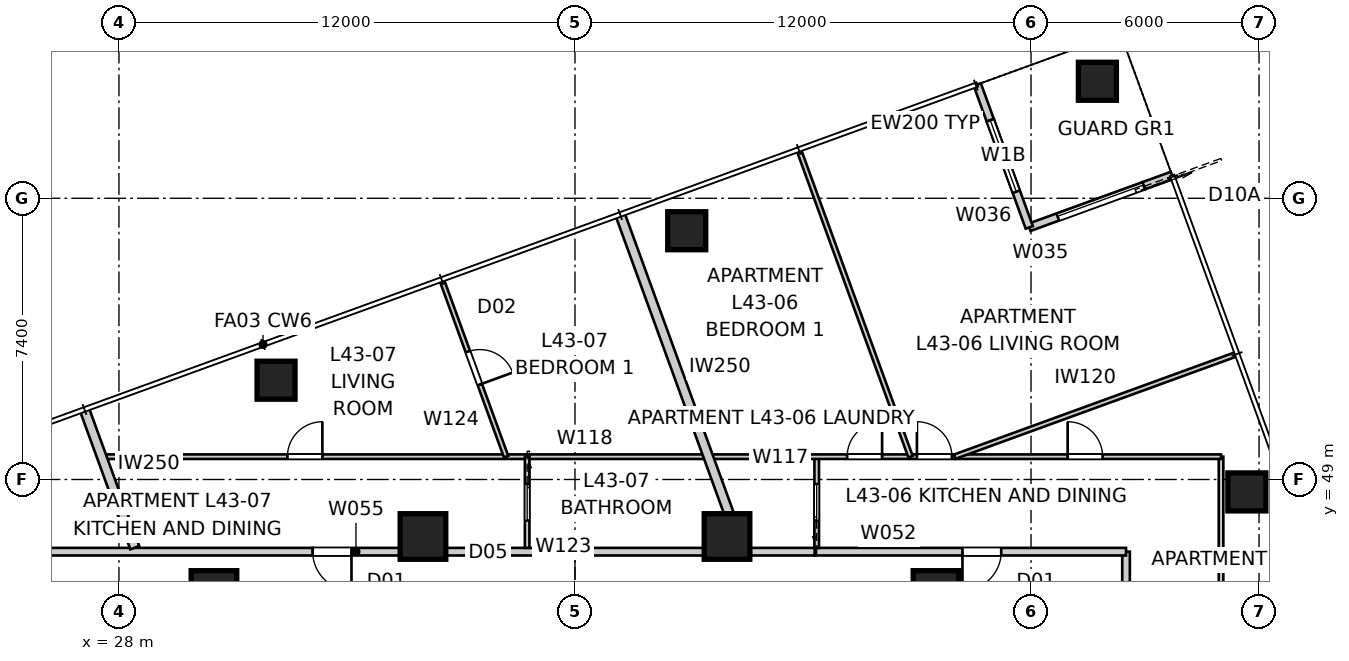
"""IFC4 building model, lengths in metres.
Left out: names, types, materials, properties, quantities, classifications, styles, units other than length and angle.
Written with IfcOpenShell. Run it as: python <this file> out.ifc"""

import sys

from ifc_helpers import new_model, si_unit, direction, frame, frame_2d, origin, origin_2d, place, context, subcontext, project, spatial, rectangle, extrude, element, fill, save


model = new_model("IFC4")
c1 = context("Model", 3, precision=1e-05, world=origin(), true_north=direction((0.0, 1.0)))
c2 = subcontext(c1, "Body", "Model", "MODEL_VIEW")
j1 = project(units=[si_unit("LENGTHUNIT", "METRE"), si_unit("PLANEANGLEUNIT", "RADIAN")], contexts=[c1])
p1 = place(None, origin())
s1 = spatial("IfcSite", under=j1, at=p1, CompositionType="ELEMENT")
p2 = place(p1, origin())
s2 = spatial("IfcBuilding", under=s1, at=p2, CompositionType="ELEMENT")
p3 = place(p2, frame((0.0, 0.0, 157.4)))
s3 = spatial("IfcBuildingStorey", under=s2, at=p3, CompositionType="ELEMENT", Elevation=157.4)
for number, where, z_axis, x_axis in (
    (1, (57.68, 48.673, 0.0), (0.0, 0.0, 1.0), (1.0, 0.0, 0.0)),
    (2, (53.747, 59.479, 0.0), (0.0, 0.0, 1.0), (1.0, 0.0, 0.0)),
    (3, (42.94, 55.546, 0.0), (0.0, 0.0, 1.0), (1.0, 0.0, 0.0)),
    (4, (32.134, 51.613, 0.0), (0.0, 0.0, 1.0), (1.0, 0.0, 0.0)),
):
    element("IfcColumn", number, at=place(p3, frame(where, z_axis=z_axis, x_axis=x_axis)), inside=s3, PredefinedType="COLUMN", context=c2, shape_type="SweptSolid", body=[
        extrude(rectangle(XDim=1.0, YDim=1.0, at=origin_2d()), origin(), (0.0, 0.0, 1.0), 3.4),
    ])
for number, where, z_axis, x_axis in (
    (5, (49.5, 46.0, 0.0), (0.0, 0.0, 1.0), (1.0, 0.0, 0.0)),
    (6, (44.0, 47.5, 0.0), (0.0, 0.0, 1.0), (1.0, 0.0, 0.0)),
    (7, (36.0, 47.5, 0.0), (0.0, 0.0, 1.0), (1.0, 0.0, 0.0)),
    (8, (30.5, 46.0, 0.0), (0.0, 0.0, 1.0), (1.0, 0.0, 0.0)),
):
    element("IfcColumn", number, at=place(p3, frame(where, z_axis=z_axis, x_axis=x_axis)), inside=s3, PredefinedType="COLUMN", context=c2, shape_type="SweptSolid", body=[
        extrude(rectangle(XDim=1.2, YDim=1.2, at=origin_2d()), origin(), (0.0, 0.0, 1.0), 3.4),
    ])
p4 = place(p3, frame((55.712, 57.002, 0.0), z_axis=(0.0, 0.0, 1.0), x_axis=(-0.939659694648, -0.342110593602, 0.0)))
e9 = element("IfcWall", 9, at=p4, inside=s3, PredefinedType="SOLIDWALL", context=c2, shape_type="SweptSolid", body=[
    extrude(rectangle(XDim=0.8, YDim=0.2, at=frame_2d((0.4, 0.0))), origin(), (0.0, 0.0, 1.0), 3.25),
])
p5 = place(p3, frame((54.96, 56.729, 0.0), z_axis=(0.0, 0.0, 1.0), x_axis=(-0.939693144909, -0.342018703306, 0.0)))
e10 = element("IfcWall", 10, at=p5, inside=s3, PredefinedType="SOLIDWALL", context=c2, shape_type="SweptSolid", body=[
    extrude(rectangle(XDim=3.2, YDim=0.2, at=frame_2d((1.6, 0.0))), origin(), (0.0, 0.0, 1.0), 2.722),
])
p6 = place(p5, origin())
e11 = element("IfcOpeningElement", 11, at=p6, cuts=e10, PredefinedType="OPENING", context=c2, shape_type="SweptSolid", body=[
    extrude(rectangle(XDim=2.4, YDim=2.1, at=frame_2d((1.2, 1.05))), frame((0.0, 0.11, 0.0), z_axis=(0.0, -1.0, 0.0), x_axis=(1.0, 0.0, 0.0)), (0.0, 0.0, 1.0), 0.22),
])
p7 = place(p3, frame((51.953, 55.634, 0.0), z_axis=(0.0, 0.0, 1.0), x_axis=(-0.341965219194, 0.939712609717, 0.0)))
e12 = element("IfcWall", 12, at=p7, inside=s3, PredefinedType="SOLIDWALL", context=c2, shape_type="SweptSolid", body=[
    extrude(rectangle(XDim=3.0, YDim=0.2, at=frame_2d((1.5, 0.0))), origin(), (0.0, 0.0, 1.0), 2.722),
])
p8 = place(p7, frame((1.0, 0.0, 0.45)))
e13 = element("IfcOpeningElement", 13, at=p8, cuts=e12, PredefinedType="OPENING", context=c2, shape_type="SweptSolid", body=[
    extrude(rectangle(XDim=2.0, YDim=1.8, at=frame_2d((1.0, 0.9))), frame((0.0, 0.11, 0.0), z_axis=(0.0, -1.0, 0.0), x_axis=(1.0, 0.0, 0.0)), (0.0, 0.0, 1.0), 0.22),
])
p9 = place(p3, frame((50.927, 58.453, 0.0), z_axis=(0.0, 0.0, 1.0), x_axis=(-0.342037080957, 0.939686455819, 0.0)))
e14 = element("IfcWall", 14, at=p9, inside=s3, PredefinedType="SOLIDWALL", context=c2, shape_type="SweptSolid", body=[
    extrude(rectangle(XDim=1.0, YDim=0.2, at=frame_2d((0.5, 0.0))), origin(), (0.0, 0.0, 1.0), 3.25),
])
p10 = place(p3, frame((54.5, 13.7, 0.0), z_axis=(0.0, 0.0, 1.0), x_axis=(0.0, 1.0, 0.0)))
e15 = element("IfcWall", 15, at=p10, inside=s3, PredefinedType="PARTITIONING", context=c2, shape_type="SweptSolid", body=[
    extrude(rectangle(XDim=33.4, YDim=0.2, at=frame_2d((16.7, 0.0))), origin(), (0.0, 0.0, 1.0), 3.25),
])
p11 = place(p10, frame((5.028, 0.0, 0.0)))
e16 = element("IfcOpeningElement", 16, at=p11, cuts=e15, PredefinedType="OPENING", context=c2, shape_type="SweptSolid", body=[
    extrude(rectangle(XDim=1.02, YDim=2.1, at=frame_2d((0.51, 1.05))), frame((0.0, 0.11, 0.0), z_axis=(0.0, -1.0, 0.0), x_axis=(1.0, 0.0, 0.0)), (0.0, 0.0, 1.0), 0.22),
])
p12 = place(p10, frame((13.587, 0.0, 0.0)))
e17 = element("IfcOpeningElement", 17, at=p12, cuts=e15, PredefinedType="OPENING", context=c2, shape_type="SweptSolid", body=[
    extrude(rectangle(XDim=1.02, YDim=2.34, at=frame_2d((0.51, 1.17))), frame((0.0, 0.11, 0.0), z_axis=(0.0, -1.0, 0.0), x_axis=(1.0, 0.0, 0.0)), (0.0, 0.0, 1.0), 0.22),
])
p13 = place(p3, frame((54.5, 47.1, 0.0), z_axis=(0.0, 0.0, 1.0), x_axis=(-1.0, 0.0, 0.0)))
e18 = element("IfcWall", 18, at=p13, inside=s3, PredefinedType="PARTITIONING", context=c2, shape_type="SweptSolid", body=[
    extrude(rectangle(XDim=8.192, YDim=0.2, at=frame_2d((4.096, 0.0))), origin(), (0.0, 0.0, 1.0), 3.25),
])
p14 = place(p13, frame((3.285, 0.0, 0.0)))
e19 = element("IfcOpeningElement", 19, at=p14, cuts=e18, PredefinedType="OPENING", context=c2, shape_type="SweptSolid", body=[
    extrude(rectangle(XDim=1.02, YDim=2.34, at=frame_2d((0.51, 1.17))), frame((0.0, 0.11, 0.0), z_axis=(0.0, -1.0, 0.0), x_axis=(1.0, 0.0, 0.0)), (0.0, 0.0, 1.0), 0.22),
])
p15 = place(p3, frame((46.308, 47.1, 0.0), z_axis=(0.0, 0.0, 1.0), x_axis=(-1.0, 0.0, 0.0)))
e20 = element("IfcWall", 20, at=p15, inside=s3, PredefinedType="PARTITIONING", context=c2, shape_type="SweptSolid", body=[
    extrude(rectangle(XDim=1.683, YDim=0.2, at=frame_2d((0.842, 0.0))), origin(), (0.0, 0.0, 1.0), 2.55),
])
p16 = place(p3, frame((44.625, 47.1, 0.0), z_axis=(0.0, 0.0, 1.0), x_axis=(-1.0, 0.0, 0.0)))
e21 = element("IfcWall", 21, at=p16, inside=s3, PredefinedType="PARTITIONING", context=c2, shape_type="SweptSolid", body=[
    extrude(rectangle(XDim=9.25, YDim=0.2, at=frame_2d((4.625, 0.0))), origin(), (0.0, 0.0, 1.0), 3.25),
])
p17 = place(p3, frame((35.375, 47.1, 0.0), z_axis=(0.0, 0.0, 1.0), x_axis=(-1.0, 0.0, 0.0)))
e22 = element("IfcWall", 22, at=p17, inside=s3, PredefinedType="PARTITIONING", context=c2, shape_type="SweptSolid", body=[
    extrude(rectangle(XDim=2.277, YDim=0.2, at=frame_2d((1.138, 0.0))), origin(), (0.0, 0.0, 1.0), 2.55),
])
p18 = place(p17, frame((1.257, 0.0, 0.0)))
e23 = element("IfcOpeningElement", 23, at=p18, cuts=e22, PredefinedType="OPENING", context=c2, shape_type="SweptSolid", body=[
    extrude(rectangle(XDim=1.02, YDim=2.34, at=frame_2d((0.51, 1.17))), frame((0.0, 0.11, 0.0), z_axis=(0.0, -1.0, 0.0), x_axis=(1.0, 0.0, 0.0)), (0.0, 0.0, 1.0), 0.22),
])
p19 = place(p3, frame((33.098, 47.1, 0.0), z_axis=(0.0, 0.0, 1.0), x_axis=(-1.0, 0.0, 0.0)))
e24 = element("IfcWall", 24, at=p19, inside=s3, PredefinedType="PARTITIONING", context=c2, shape_type="SweptSolid", body=[
    extrude(rectangle(XDim=7.598, YDim=0.2, at=frame_2d((3.799, 0.0))), origin(), (0.0, 0.0, 1.0), 3.25),
])
p20 = place(p3, frame((41.188, 55.973, 0.0), z_axis=(0.0, 0.0, 1.0), x_axis=(0.342014066156, -0.939694832673, 0.0)))
e25 = element("IfcWall", 25, at=p20, inside=s3, PredefinedType="PARTITIONING", context=c2, shape_type="SweptSolid", body=[
    extrude(rectangle(XDim=9.331, YDim=0.25, at=frame_2d((4.665, 0.0))), origin(), (0.0, 0.0, 1.0), 3.25),
])
p21 = place(p3, frame((27.093, 50.843, 0.0), z_axis=(0.0, 0.0, 1.0), x_axis=(0.342031698406, -0.939688415, 0.0)))
e26 = element("IfcWall", 26, at=p21, inside=s3, PredefinedType="PARTITIONING", context=c2, shape_type="SweptSolid", body=[
    extrude(rectangle(XDim=3.871, YDim=0.25, at=frame_2d((1.936, 0.0))), origin(), (0.0, 0.0, 1.0), 3.25),
])
p22 = place(p3, frame((57.0, 49.6, 0.0), z_axis=(0.0, 0.0, 1.0), x_axis=(0.0, -1.0, 0.0)))
e27 = element("IfcWall", 27, at=p22, inside=s3, PredefinedType="PARTITIONING", context=c2, shape_type="SweptSolid", body=[
    extrude(rectangle(XDim=18.589, YDim=0.12, at=frame_2d((9.294, 0.0))), origin(), (0.0, 0.0, 1.0), 2.55),
])
p23 = place(p22, frame((8.452, 0.0, 0.0)))
e28 = element("IfcOpeningElement", 28, at=p23, cuts=e27, PredefinedType="OPENING", context=c2, shape_type="SweptSolid", body=[
    extrude(rectangle(XDim=0.96, YDim=2.1, at=frame_2d((0.48, 1.05))), frame((0.0, 0.07, 0.0), z_axis=(0.0, -1.0, 0.0), x_axis=(1.0, 0.0, 0.0)), (0.0, 0.0, 1.0), 0.14),
])
p24 = place(p22, frame((11.889, 0.0, 0.0)))
e29 = element("IfcOpeningElement", 29, at=p24, cuts=e27, PredefinedType="OPENING", context=c2, shape_type="SweptSolid", body=[
    extrude(rectangle(XDim=0.96, YDim=2.1, at=frame_2d((0.48, 1.05))), frame((0.0, 0.07, 0.0), z_axis=(0.0, -1.0, 0.0), x_axis=(1.0, 0.0, 0.0)), (0.0, 0.0, 1.0), 0.14),
])
p25 = place(p3, frame((46.361, 47.2, 0.0), z_axis=(0.0, 0.0, 1.0), x_axis=(0.0, 1.0, 0.0)))
e30 = element("IfcWall", 30, at=p25, inside=s3, PredefinedType="PARTITIONING", context=c2, shape_type="SweptSolid", body=[
    extrude(rectangle(XDim=2.4, YDim=0.12, at=frame_2d((1.2, 0.0))), origin(), (0.0, 0.0, 1.0), 3.25),
])
p26 = place(p25, frame((0.72, 0.0, 0.0)))
e31 = element("IfcOpeningElement", 31, at=p26, cuts=e30, PredefinedType="OPENING", context=c2, shape_type="SweptSolid", body=[
    extrude(rectangle(XDim=0.96, YDim=2.1, at=frame_2d((0.48, 1.05))), frame((0.0, 0.07, 0.0), z_axis=(0.0, -1.0, 0.0), x_axis=(1.0, 0.0, 0.0)), (0.0, 0.0, 1.0), 0.14),
])
p27 = place(p3, frame((27.545, 49.6, 0.0), z_axis=(0.0, 0.0, 1.0), x_axis=(1.0, 0.0, 0.0)))
e32 = element("IfcWall", 32, at=p27, inside=s3, PredefinedType="PARTITIONING", context=c2, shape_type="SweptSolid", body=[
    extrude(rectangle(XDim=29.455, YDim=0.12, at=frame_2d((14.727, 0.0))), origin(), (0.0, 0.0, 1.0), 3.25),
])
p28 = place(p27, frame((4.887, 0.0, 0.0)))
e33 = element("IfcOpeningElement", 33, at=p28, cuts=e32, PredefinedType="OPENING", context=c2, shape_type="SweptSolid", body=[
    extrude(rectangle(XDim=0.92, YDim=2.34, at=frame_2d((0.46, 1.17))), frame((0.0, 0.07, 0.0), z_axis=(0.0, -1.0, 0.0), x_axis=(1.0, 0.0, 0.0)), (0.0, 0.0, 1.0), 0.14),
])
p29 = place(p27, frame((25.418, 0.0, 0.0)))
e34 = element("IfcOpeningElement", 34, at=p29, cuts=e32, PredefinedType="OPENING", context=c2, shape_type="SweptSolid", body=[
    extrude(rectangle(XDim=0.92, YDim=2.34, at=frame_2d((0.46, 1.17))), frame((0.0, 0.07, 0.0), z_axis=(0.0, -1.0, 0.0), x_axis=(1.0, 0.0, 0.0)), (0.0, 0.0, 1.0), 0.14),
])
p30 = place(p27, frame((19.616, 0.0, 0.0)))
e35 = element("IfcOpeningElement", 35, at=p30, cuts=e32, PredefinedType="OPENING", context=c2, shape_type="SweptSolid", body=[
    extrude(rectangle(XDim=0.92, YDim=2.34, at=frame_2d((0.46, 1.17))), frame((0.0, 0.07, 0.0), z_axis=(0.0, -1.0, 0.0), x_axis=(1.0, 0.0, 0.0)), (0.0, 0.0, 1.0), 0.14),
])
p31 = place(p27, frame((21.452, 0.0, 0.0)))
e36 = element("IfcOpeningElement", 36, at=p31, cuts=e32, PredefinedType="OPENING", context=c2, shape_type="SweptSolid", body=[
    extrude(rectangle(XDim=0.92, YDim=2.34, at=frame_2d((0.46, 1.17))), frame((0.0, 0.07, 0.0), z_axis=(0.0, -1.0, 0.0), x_axis=(1.0, 0.0, 0.0)), (0.0, 0.0, 1.0), 0.14),
])
p32 = place(p3, frame((48.829, 49.6, 0.0), z_axis=(0.0, 0.0, 1.0), x_axis=(-0.34202238111, 0.939691806296, 0.0)))
e37 = element("IfcWall", 37, at=p32, inside=s3, PredefinedType="PARTITIONING", context=c2, shape_type="SweptSolid", body=[
    extrude(rectangle(XDim=8.562, YDim=0.12, at=frame_2d((4.281, 0.0))), origin(), (0.0, 0.0, 1.0), 3.25),
])
p33 = place(p3, frame((57.385, 52.29, 0.0), z_axis=(0.0, 0.0, 1.0), x_axis=(-0.939694604347, -0.342014693486, 0.0)))
e38 = element("IfcWall", 38, at=p33, inside=s3, PredefinedType="PARTITIONING", context=c2, shape_type="SweptSolid", body=[
    extrude(rectangle(XDim=7.866, YDim=0.12, at=frame_2d((3.933, 0.0))), origin(), (0.0, 0.0, 1.0), 3.25),
])
p34 = place(p3, frame((38.741, 49.6, 0.0), z_axis=(0.0, 0.0, 1.0), x_axis=(0.0, -1.0, 0.0)))
e39 = element("IfcWall", 39, at=p34, inside=s3, PredefinedType="PARTITIONING", context=c2, shape_type="SweptSolid", body=[
    extrude(rectangle(XDim=2.4, YDim=0.12, at=frame_2d((1.2, 0.0))), origin(), (0.0, 0.0, 1.0), 3.25),
])
p35 = place(p34, frame((0.72, 0.0, 0.0)))
e40 = element("IfcOpeningElement", 40, at=p35, cuts=e39, PredefinedType="OPENING", context=c2, shape_type="SweptSolid", body=[
    extrude(rectangle(XDim=0.96, YDim=2.1, at=frame_2d((0.48, 1.05))), frame((0.0, 0.07, 0.0), z_axis=(0.0, -1.0, 0.0), x_axis=(1.0, 0.0, 0.0)), (0.0, 0.0, 1.0), 0.14),
])
p36 = place(p3, frame((36.504, 54.225, 0.0), z_axis=(0.0, 0.0, 1.0), x_axis=(0.342017860496, -0.939693451665, 0.0)))
e41 = element("IfcWall", 41, at=p36, inside=s3, PredefinedType="PARTITIONING", context=c2, shape_type="SweptSolid", body=[
    extrude(rectangle(XDim=4.922, YDim=0.12, at=frame_2d((2.461, 0.0))), origin(), (0.0, 0.0, 1.0), 3.25),
])
p37 = place(p36, frame((1.981, 0.0, 0.0)))
e42 = element("IfcOpeningElement", 42, at=p37, cuts=e41, PredefinedType="OPENING", context=c2, shape_type="SweptSolid", body=[
    extrude(rectangle(XDim=0.92, YDim=2.34, at=frame_2d((0.46, 1.17))), frame((0.0, 0.07, 0.0), z_axis=(0.0, -1.0, 0.0), x_axis=(1.0, 0.0, 0.0)), (0.0, 0.0, 1.0), 0.14),
])
p38 = place(p6, origin())
e43 = element("IfcDoor", 43, at=p38, inside=s3, OperationType="SLIDING_TO_LEFT", PredefinedType="DOOR", context=c2, shape_type="SweptSolid", body=[
    extrude(rectangle(XDim=2.4, YDim=2.1, at=frame_2d((1.2, 1.05))), frame((0.0, 0.025, 0.0), z_axis=(0.0, -1.0, 0.0), x_axis=(1.0, 0.0, 0.0)), (0.0, 0.0, 1.0), 0.05),
])
fill(e11, e43)
p39 = place(p8, origin())
e44 = element("IfcWindow", 44, at=p39, inside=s3, PartitioningType="SINGLE_PANEL", PredefinedType="WINDOW", context=c2, shape_type="SweptSolid", body=[
    extrude(rectangle(XDim=2.0, YDim=1.8, at=frame_2d((1.0, 0.9))), frame((0.0, 0.03, 0.0), z_axis=(0.0, -1.0, 0.0), x_axis=(1.0, 0.0, 0.0)), (0.0, 0.0, 1.0), 0.06),
])
fill(e13, e44)
p40 = place(p18, origin())
e45 = element("IfcDoor", 45, at=p40, inside=s3, OperationType="SINGLE_SWING_LEFT", PredefinedType="DOOR", context=c2, shape_type="SweptSolid", body=[
    extrude(rectangle(XDim=1.02, YDim=2.34, at=frame_2d((0.51, 1.17))), frame((0.0, 0.025, 0.0), z_axis=(0.0, -1.0, 0.0), x_axis=(1.0, 0.0, 0.0)), (0.0, 0.0, 1.0), 0.05),
])
fill(e23, e45)
p41 = place(p14, origin())
e46 = element("IfcDoor", 46, at=p41, inside=s3, OperationType="SINGLE_SWING_RIGHT", PredefinedType="DOOR", context=c2, shape_type="SweptSolid", body=[
    extrude(rectangle(XDim=1.02, YDim=2.34, at=frame_2d((0.51, 1.17))), frame((0.0, 0.025, 0.0), z_axis=(0.0, -1.0, 0.0), x_axis=(1.0, 0.0, 0.0)), (0.0, 0.0, 1.0), 0.05),
])
fill(e19, e46)
p42 = place(p28, origin())
e47 = element("IfcDoor", 47, at=p42, inside=s3, OperationType="SINGLE_SWING_RIGHT", PredefinedType="DOOR", context=c2, shape_type="SweptSolid", body=[
    extrude(rectangle(XDim=0.92, YDim=2.34, at=frame_2d((0.46, 1.17))), frame((0.0, 0.025, 0.0), z_axis=(0.0, -1.0, 0.0), x_axis=(1.0, 0.0, 0.0)), (0.0, 0.0, 1.0), 0.05),
])
fill(e33, e47)
p43 = place(p35, origin())
e48 = element("IfcDoor", 48, at=p43, inside=s3, OperationType="SLIDING_TO_LEFT", PredefinedType="DOOR", context=c2, shape_type="SweptSolid", body=[
    extrude(rectangle(XDim=0.96, YDim=2.1, at=frame_2d((0.48, 1.05))), frame((0.0, 0.025, 0.0), z_axis=(0.0, -1.0, 0.0), x_axis=(1.0, 0.0, 0.0)), (0.0, 0.0, 1.0), 0.05),
])
fill(e40, e48)
p44 = place(p29, origin())
e49 = element("IfcDoor", 49, at=p44, inside=s3, OperationType="SINGLE_SWING_LEFT", PredefinedType="DOOR", context=c2, shape_type="SweptSolid", body=[
    extrude(rectangle(XDim=0.92, YDim=2.34, at=frame_2d((0.46, 1.17))), frame((0.0, 0.025, 0.0), z_axis=(0.0, -1.0, 0.0), x_axis=(1.0, 0.0, 0.0)), (0.0, 0.0, 1.0), 0.05),
])
fill(e34, e49)
p45 = place(p30, origin())
e50 = element("IfcDoor", 50, at=p45, inside=s3, OperationType="SINGLE_SWING_RIGHT", PredefinedType="DOOR", context=c2, shape_type="SweptSolid", body=[
    extrude(rectangle(XDim=0.92, YDim=2.34, at=frame_2d((0.46, 1.17))), frame((0.0, 0.025, 0.0), z_axis=(0.0, -1.0, 0.0), x_axis=(1.0, 0.0, 0.0)), (0.0, 0.0, 1.0), 0.05),
])
fill(e35, e50)
p46 = place(p26, origin())
e51 = element("IfcDoor", 51, at=p46, inside=s3, OperationType="SLIDING_TO_LEFT", PredefinedType="DOOR", context=c2, shape_type="SweptSolid", body=[
    extrude(rectangle(XDim=0.96, YDim=2.1, at=frame_2d((0.48, 1.05))), frame((0.0, 0.025, 0.0), z_axis=(0.0, -1.0, 0.0), x_axis=(1.0, 0.0, 0.0)), (0.0, 0.0, 1.0), 0.05),
])
fill(e31, e51)
p47 = place(p31, origin())
e52 = element("IfcDoor", 52, at=p47, inside=s3, OperationType="SINGLE_SWING_LEFT", PredefinedType="DOOR", context=c2, shape_type="SweptSolid", body=[
    extrude(rectangle(XDim=0.92, YDim=2.34, at=frame_2d((0.46, 1.17))), frame((0.0, 0.025, 0.0), z_axis=(0.0, -1.0, 0.0), x_axis=(1.0, 0.0, 0.0)), (0.0, 0.0, 1.0), 0.05),
])
fill(e36, e52)
p48 = place(p37, origin())
e53 = element("IfcDoor", 53, at=p48, inside=s3, OperationType="SINGLE_SWING_RIGHT", PredefinedType="DOOR", context=c2, shape_type="SweptSolid", body=[
    extrude(rectangle(XDim=0.92, YDim=2.34, at=frame_2d((0.46, 1.17))), frame((0.0, 0.025, 0.0), z_axis=(0.0, -1.0, 0.0), x_axis=(1.0, 0.0, 0.0)), (0.0, 0.0, 1.0), 0.05),
])
fill(e42, e53)
save(model, sys.argv[1])
